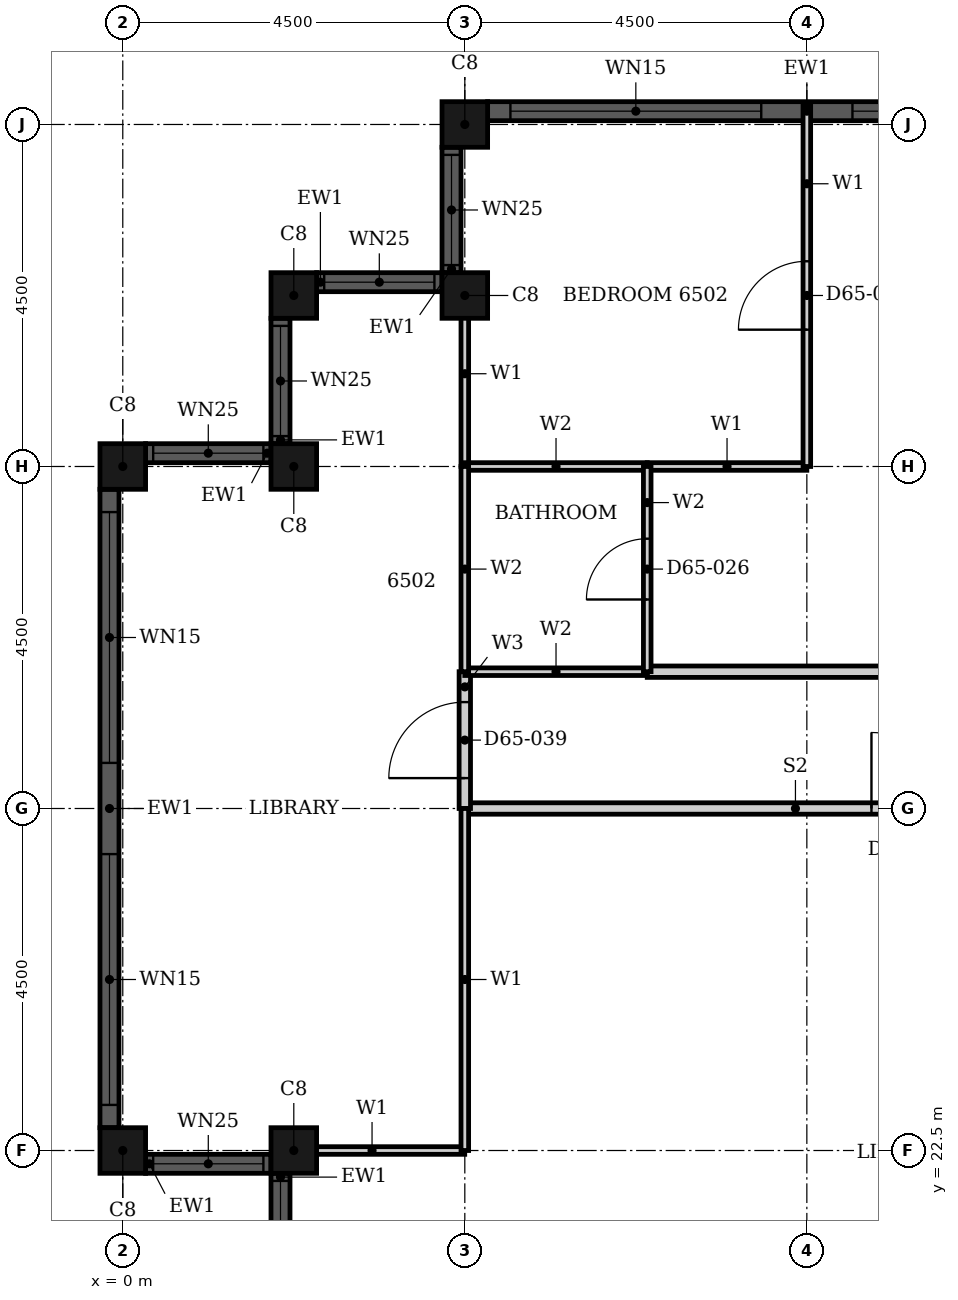
"""IFC4 building model, lengths in metres.
Left out: names, types, materials, properties, quantities, classifications, styles, units other than length and angle.
Written with IfcOpenShell. Run it as: python <this file> out.ifc"""

import sys

from ifc_helpers import new_model, si_unit, direction, frame, frame_2d, origin, origin_2d, place, context, subcontext, project, spatial, rectangle, hollow_rectangle, extrude, element, fill, save


model = new_model("IFC4")
c1 = context("Model", 3, precision=1e-05, world=origin(), true_north=direction((0.0, 1.0)))
c2 = subcontext(c1, "Body", "Model", "MODEL_VIEW")
j1 = project(units=[si_unit("LENGTHUNIT", "METRE"), si_unit("PLANEANGLEUNIT", "RADIAN")], contexts=[c1])
p1 = place(None, origin())
s1 = spatial("IfcSite", under=j1, at=p1, CompositionType="ELEMENT")
p2 = place(p1, origin())
s2 = spatial("IfcBuilding", under=s1, at=p2, CompositionType="ELEMENT")
p3 = place(p2, frame((0.0, 0.0, 256.4)))
s3 = spatial("IfcBuildingStorey", under=s2, at=p3, CompositionType="ELEMENT", Elevation=256.4)
for number, where, z_axis, x_axis in (
    (1, (4.5, 36.0, 0.0), (0.0, 0.0, 1.0), (1.0, 0.0, 0.0)),
    (2, (4.5, 33.75, 0.0), (0.0, 0.0, 1.0), (1.0, 0.0, 0.0)),
    (3, (2.25, 33.75, 0.0), (0.0, 0.0, 1.0), (1.0, 0.0, 0.0)),
    (4, (2.25, 31.5, 0.0), (0.0, 0.0, 1.0), (1.0, 0.0, 0.0)),
    (5, (0.0, 31.5, 0.0), (0.0, 0.0, 1.0), (1.0, 0.0, 0.0)),
    (6, (0.0, 22.5, 0.0), (0.0, 0.0, 1.0), (1.0, 0.0, 0.0)),
    (7, (2.25, 22.5, 0.0), (0.0, 0.0, 1.0), (1.0, 0.0, 0.0)),
):
    element("IfcColumn", number, at=place(p3, frame(where, z_axis=z_axis, x_axis=x_axis)), inside=s3, PredefinedType="COLUMN", context=c2, shape_type="SweptSolid", body=[
        extrude(hollow_rectangle(XDim=0.6, YDim=0.6, WallThickness=0.02, at=origin_2d()), origin(), (0.0, 0.0, 1.0), 3.7),
    ])
p4 = place(p3, frame((13.2, 36.175, 0.0), z_axis=(0.0, 0.0, 1.0), x_axis=(-1.0, 0.0, 0.0)))
e8 = element("IfcWall", 8, at=p4, inside=s3, PredefinedType="SOLIDWALL", context=c2, shape_type="SweptSolid", body=[
    extrude(rectangle(XDim=8.4, YDim=0.25, at=frame_2d((4.2, 0.0))), origin(), (0.0, 0.0, 1.0), 3.7),
])
p5 = place(p4, frame((0.3, 0.0, 0.45)))
e9 = element("IfcOpeningElement", 9, at=p5, cuts=e8, PredefinedType="OPENING", context=c2, shape_type="SweptSolid", body=[
    extrude(rectangle(XDim=3.3, YDim=2.3, at=frame_2d((1.65, 1.15))), frame((0.0, 0.135, 0.0), z_axis=(0.0, -1.0, 0.0), x_axis=(1.0, 0.0, 0.0)), (0.0, 0.0, 1.0), 0.27),
])
p6 = place(p4, frame((4.8, 0.0, 0.45)))
e10 = element("IfcOpeningElement", 10, at=p6, cuts=e8, PredefinedType="OPENING", context=c2, shape_type="SweptSolid", body=[
    extrude(rectangle(XDim=3.3, YDim=2.3, at=frame_2d((1.65, 1.15))), frame((0.0, 0.135, 0.0), z_axis=(0.0, -1.0, 0.0), x_axis=(1.0, 0.0, 0.0)), (0.0, 0.0, 1.0), 0.27),
])
p7 = place(p3, frame((4.325, 35.7, 0.0), z_axis=(0.0, 0.0, 1.0), x_axis=(0.0, -1.0, 0.0)))
e11 = element("IfcWall", 11, at=p7, inside=s3, PredefinedType="SOLIDWALL", context=c2, shape_type="SweptSolid", body=[
    extrude(rectangle(XDim=1.65, YDim=0.25, at=frame_2d((0.825, 0.0))), origin(), (0.0, 0.0, 1.0), 3.7),
])
p8 = place(p7, frame((0.1, 0.0, 0.9)))
e12 = element("IfcOpeningElement", 12, at=p8, cuts=e11, PredefinedType="OPENING", context=c2, shape_type="SweptSolid", body=[
    extrude(rectangle(XDim=1.45, YDim=1.85, at=frame_2d((0.725, 0.925))), frame((0.0, 0.135, 0.0), z_axis=(0.0, -1.0, 0.0), x_axis=(1.0, 0.0, 0.0)), (0.0, 0.0, 1.0), 0.27),
])
p9 = place(p3, frame((4.2, 33.925, 0.0), z_axis=(0.0, 0.0, 1.0), x_axis=(-1.0, 0.0, 0.0)))
e13 = element("IfcWall", 13, at=p9, inside=s3, PredefinedType="SOLIDWALL", context=c2, shape_type="SweptSolid", body=[
    extrude(rectangle(XDim=1.65, YDim=0.25, at=frame_2d((0.825, 0.0))), origin(), (0.0, 0.0, 1.0), 3.7),
])
p10 = place(p9, frame((0.1, 0.0, 0.9)))
e14 = element("IfcOpeningElement", 14, at=p10, cuts=e13, PredefinedType="OPENING", context=c2, shape_type="SweptSolid", body=[
    extrude(rectangle(XDim=1.45, YDim=1.85, at=frame_2d((0.725, 0.925))), frame((0.0, 0.135, 0.0), z_axis=(0.0, -1.0, 0.0), x_axis=(1.0, 0.0, 0.0)), (0.0, 0.0, 1.0), 0.27),
])
p11 = place(p3, frame((2.075, 33.45, 0.0), z_axis=(0.0, 0.0, 1.0), x_axis=(0.0, -1.0, 0.0)))
e15 = element("IfcWall", 15, at=p11, inside=s3, PredefinedType="SOLIDWALL", context=c2, shape_type="SweptSolid", body=[
    extrude(rectangle(XDim=1.65, YDim=0.25, at=frame_2d((0.825, 0.0))), origin(), (0.0, 0.0, 1.0), 3.7),
])
p12 = place(p11, frame((0.1, 0.0, 0.9)))
e16 = element("IfcOpeningElement", 16, at=p12, cuts=e15, PredefinedType="OPENING", context=c2, shape_type="SweptSolid", body=[
    extrude(rectangle(XDim=1.45, YDim=1.85, at=frame_2d((0.725, 0.925))), frame((0.0, 0.135, 0.0), z_axis=(0.0, -1.0, 0.0), x_axis=(1.0, 0.0, 0.0)), (0.0, 0.0, 1.0), 0.27),
])
p13 = place(p3, frame((1.95, 31.675, 0.0), z_axis=(0.0, 0.0, 1.0), x_axis=(-1.0, 0.0, 0.0)))
e17 = element("IfcWall", 17, at=p13, inside=s3, PredefinedType="SOLIDWALL", context=c2, shape_type="SweptSolid", body=[
    extrude(rectangle(XDim=1.65, YDim=0.25, at=frame_2d((0.825, 0.0))), origin(), (0.0, 0.0, 1.0), 3.7),
])
p14 = place(p13, frame((0.1, 0.0, 0.9)))
e18 = element("IfcOpeningElement", 18, at=p14, cuts=e17, PredefinedType="OPENING", context=c2, shape_type="SweptSolid", body=[
    extrude(rectangle(XDim=1.45, YDim=1.85, at=frame_2d((0.725, 0.925))), frame((0.0, 0.135, 0.0), z_axis=(0.0, -1.0, 0.0), x_axis=(1.0, 0.0, 0.0)), (0.0, 0.0, 1.0), 0.27),
])
p15 = place(p3, frame((-0.175, 31.2, 0.0), z_axis=(0.0, 0.0, 1.0), x_axis=(0.0, -1.0, 0.0)))
e19 = element("IfcWall", 19, at=p15, inside=s3, PredefinedType="SOLIDWALL", context=c2, shape_type="SweptSolid", body=[
    extrude(rectangle(XDim=8.4, YDim=0.25, at=frame_2d((4.2, 0.0))), origin(), (0.0, 0.0, 1.0), 3.7),
])
p16 = place(p15, frame((0.3, 0.0, 0.45)))
e20 = element("IfcOpeningElement", 20, at=p16, cuts=e19, PredefinedType="OPENING", context=c2, shape_type="SweptSolid", body=[
    extrude(rectangle(XDim=3.3, YDim=2.3, at=frame_2d((1.65, 1.15))), frame((0.0, 0.135, 0.0), z_axis=(0.0, -1.0, 0.0), x_axis=(1.0, 0.0, 0.0)), (0.0, 0.0, 1.0), 0.27),
])
p17 = place(p15, frame((4.8, 0.0, 0.45)))
e21 = element("IfcOpeningElement", 21, at=p17, cuts=e19, PredefinedType="OPENING", context=c2, shape_type="SweptSolid", body=[
    extrude(rectangle(XDim=3.3, YDim=2.3, at=frame_2d((1.65, 1.15))), frame((0.0, 0.135, 0.0), z_axis=(0.0, -1.0, 0.0), x_axis=(1.0, 0.0, 0.0)), (0.0, 0.0, 1.0), 0.27),
])
p18 = place(p3, frame((0.3, 22.325, 0.0), z_axis=(0.0, 0.0, 1.0), x_axis=(1.0, 0.0, 0.0)))
e22 = element("IfcWall", 22, at=p18, inside=s3, PredefinedType="SOLIDWALL", context=c2, shape_type="SweptSolid", body=[
    extrude(rectangle(XDim=1.65, YDim=0.25, at=frame_2d((0.825, 0.0))), origin(), (0.0, 0.0, 1.0), 3.7),
])
p19 = place(p18, frame((0.1, 0.0, 0.9)))
e23 = element("IfcOpeningElement", 23, at=p19, cuts=e22, PredefinedType="OPENING", context=c2, shape_type="SweptSolid", body=[
    extrude(rectangle(XDim=1.45, YDim=1.85, at=frame_2d((0.725, 0.925))), frame((0.0, 0.135, 0.0), z_axis=(0.0, -1.0, 0.0), x_axis=(1.0, 0.0, 0.0)), (0.0, 0.0, 1.0), 0.27),
])
p20 = place(p3, frame((2.075, 22.2, 0.0), z_axis=(0.0, 0.0, 1.0), x_axis=(0.0, -1.0, 0.0)))
e24 = element("IfcWall", 24, at=p20, inside=s3, PredefinedType="SOLIDWALL", context=c2, shape_type="SweptSolid", body=[
    extrude(rectangle(XDim=1.65, YDim=0.25, at=frame_2d((0.825, 0.0))), origin(), (0.0, 0.0, 1.0), 3.7),
])
p21 = place(p20, frame((0.1, 0.0, 0.9)))
e25 = element("IfcOpeningElement", 25, at=p21, cuts=e24, PredefinedType="OPENING", context=c2, shape_type="SweptSolid", body=[
    extrude(rectangle(XDim=1.45, YDim=1.85, at=frame_2d((0.725, 0.925))), frame((0.0, 0.135, 0.0), z_axis=(0.0, -1.0, 0.0), x_axis=(1.0, 0.0, 0.0)), (0.0, 0.0, 1.0), 0.27),
])
p22 = place(p3, frame((4.5, 27.0, 0.0), z_axis=(0.0, 0.0, 1.0), x_axis=(1.0, 0.0, 0.0)))
e26 = element("IfcWall", 26, at=p22, inside=s3, PredefinedType="PARTITIONING", context=c2, shape_type="SweptSolid", body=[
    extrude(rectangle(XDim=13.5, YDim=0.15, at=frame_2d((6.75, 0.0))), origin(), (0.0, 0.0, 1.0), 2.68),
])
p23 = place(p22, frame((5.35, 0.0, 0.0)))
e27 = element("IfcOpeningElement", 27, at=p23, cuts=e26, PredefinedType="OPENING", context=c2, shape_type="SweptSolid", body=[
    extrude(rectangle(XDim=1.0, YDim=2.1, at=frame_2d((0.5, 1.05))), frame((0.0, 0.085, 0.0), z_axis=(0.0, -1.0, 0.0), x_axis=(1.0, 0.0, 0.0)), (0.0, 0.0, 1.0), 0.17),
])
p24 = place(p3, frame((6.9, 28.8, 0.0), z_axis=(0.0, 0.0, 1.0), x_axis=(1.0, 0.0, 0.0)))
e28 = element("IfcWall", 28, at=p24, inside=s3, PredefinedType="PARTITIONING", context=c2, shape_type="SweptSolid", body=[
    extrude(rectangle(XDim=9.299, YDim=0.15, at=frame_2d((4.649, 0.0))), origin(), (0.0, 0.0, 1.0), 3.4),
])
p25 = place(p3, frame((4.5, 27.0, 0.0), z_axis=(0.0, 0.0, 1.0), x_axis=(0.0, 1.0, 0.0)))
e29 = element("IfcWall", 29, at=p25, inside=s3, PredefinedType="PARTITIONING", context=c2, shape_type="SweptSolid", body=[
    extrude(rectangle(XDim=1.8, YDim=0.15, at=frame_2d((0.9, 0.0))), origin(), (0.0, 0.0, 1.0), 3.4),
])
p26 = place(p25, frame((0.4, 0.0, 0.0)))
e30 = element("IfcOpeningElement", 30, at=p26, cuts=e29, PredefinedType="OPENING", context=c2, shape_type="SweptSolid", body=[
    extrude(rectangle(XDim=1.0, YDim=2.1, at=frame_2d((0.5, 1.05))), frame((0.0, 0.085, 0.0), z_axis=(0.0, -1.0, 0.0), x_axis=(1.0, 0.0, 0.0)), (0.0, 0.0, 1.0), 0.17),
])
p27 = place(p3, frame((2.06, 22.5, 0.0), z_axis=(0.0, 0.0, 1.0), x_axis=(1.0, 0.0, 0.0)))
e31 = element("IfcWall", 31, at=p27, inside=s3, PredefinedType="PARTITIONING", context=c2, shape_type="SweptSolid", body=[
    extrude(rectangle(XDim=2.439, YDim=0.1, at=frame_2d((1.219, 0.0))), origin(), (0.0, 0.0, 1.0), 2.68),
])
p28 = place(p3, frame((6.9, 31.5, 0.0), z_axis=(0.0, 0.0, 1.0), x_axis=(1.0, 0.0, 0.0)))
e32 = element("IfcWall", 32, at=p28, inside=s3, PredefinedType="PARTITIONING", context=c2, shape_type="SweptSolid", body=[
    extrude(rectangle(XDim=2.1, YDim=0.1, at=frame_2d((1.05, 0.0))), origin(), (0.0, 0.0, 1.0), 2.68),
])
p29 = place(p3, frame((4.5, 31.501, 0.0), z_axis=(0.0, 0.0, 1.0), x_axis=(0.0, 1.0, 0.0)))
e33 = element("IfcWall", 33, at=p29, inside=s3, PredefinedType="PARTITIONING", context=c2, shape_type="SweptSolid", body=[
    extrude(rectangle(XDim=2.439, YDim=0.1, at=frame_2d((1.219, 0.0))), origin(), (0.0, 0.0, 1.0), 3.4),
])
p30 = place(p3, frame((4.5, 22.5, 0.0), z_axis=(0.0, 0.0, 1.0), x_axis=(0.0, 1.0, 0.0)))
e34 = element("IfcWall", 34, at=p30, inside=s3, PredefinedType="PARTITIONING", context=c2, shape_type="SweptSolid", body=[
    extrude(rectangle(XDim=4.5, YDim=0.1, at=frame_2d((2.25, 0.0))), origin(), (0.0, 0.0, 1.0), 3.4),
])
p31 = place(p3, frame((9.0, 31.5, 0.0), z_axis=(0.0, 0.0, 1.0), x_axis=(0.0, 1.0, 0.0)))
e35 = element("IfcWall", 35, at=p31, inside=s3, PredefinedType="PARTITIONING", context=c2, shape_type="SweptSolid", body=[
    extrude(rectangle(XDim=4.74, YDim=0.1, at=frame_2d((2.37, 0.0))), origin(), (0.0, 0.0, 1.0), 3.4),
])
p32 = place(p31, frame((1.8, 0.0, 0.0)))
e36 = element("IfcOpeningElement", 36, at=p32, cuts=e35, PredefinedType="OPENING", context=c2, shape_type="SweptSolid", body=[
    extrude(rectangle(XDim=0.9, YDim=2.1, at=frame_2d((0.45, 1.05))), frame((0.0, 0.06, 0.0), z_axis=(0.0, -1.0, 0.0), x_axis=(1.0, 0.0, 0.0)), (0.0, 0.0, 1.0), 0.12),
])
p33 = place(p3, frame((4.5, 28.8, 0.0), z_axis=(0.0, 0.0, 1.0), x_axis=(1.0, 0.0, 0.0)))
e37 = element("IfcWall", 37, at=p33, inside=s3, PredefinedType="PARTITIONING", context=c2, shape_type="SweptSolid", body=[
    extrude(rectangle(XDim=2.4, YDim=0.1, at=frame_2d((1.2, 0.0))), origin(), (0.0, 0.0, 1.0), 3.4),
])
p34 = place(p3, frame((4.5, 31.5, 0.0), z_axis=(0.0, 0.0, 1.0), x_axis=(1.0, 0.0, 0.0)))
e38 = element("IfcWall", 38, at=p34, inside=s3, PredefinedType="PARTITIONING", context=c2, shape_type="SweptSolid", body=[
    extrude(rectangle(XDim=2.4, YDim=0.1, at=frame_2d((1.2, 0.0))), origin(), (0.0, 0.0, 1.0), 2.68),
])
p35 = place(p3, frame((4.5, 28.8, 0.0), z_axis=(0.0, 0.0, 1.0), x_axis=(0.0, 1.0, 0.0)))
e39 = element("IfcWall", 39, at=p35, inside=s3, PredefinedType="PARTITIONING", context=c2, shape_type="SweptSolid", body=[
    extrude(rectangle(XDim=2.7, YDim=0.1, at=frame_2d((1.35, 0.0))), origin(), (0.0, 0.0, 1.0), 3.4),
])
p36 = place(p3, frame((6.9, 28.8, 0.0), z_axis=(0.0, 0.0, 1.0), x_axis=(0.0, 1.0, 0.0)))
e40 = element("IfcWall", 40, at=p36, inside=s3, PredefinedType="PARTITIONING", context=c2, shape_type="SweptSolid", body=[
    extrude(rectangle(XDim=2.7, YDim=0.1, at=frame_2d((1.35, 0.0))), origin(), (0.0, 0.0, 1.0), 3.4),
])
p37 = place(p36, frame((0.95, 0.0, 0.0)))
e41 = element("IfcOpeningElement", 41, at=p37, cuts=e40, PredefinedType="OPENING", context=c2, shape_type="SweptSolid", body=[
    extrude(rectangle(XDim=0.8, YDim=2.1, at=frame_2d((0.4, 1.05))), frame((0.0, 0.06, 0.0), z_axis=(0.0, -1.0, 0.0), x_axis=(1.0, 0.0, 0.0)), (0.0, 0.0, 1.0), 0.12),
])
p38 = place(p5, origin())
e42 = element("IfcWindow", 42, at=p38, inside=s3, PartitioningType="SINGLE_PANEL", PredefinedType="WINDOW", context=c2, shape_type="SweptSolid", body=[
    extrude(rectangle(XDim=3.3, YDim=2.3, at=frame_2d((1.65, 1.15))), frame((0.0, 0.03, 0.0), z_axis=(0.0, -1.0, 0.0), x_axis=(1.0, 0.0, 0.0)), (0.0, 0.0, 1.0), 0.06),
])
fill(e9, e42)
p39 = place(p6, origin())
e43 = element("IfcWindow", 43, at=p39, inside=s3, PartitioningType="SINGLE_PANEL", PredefinedType="WINDOW", context=c2, shape_type="SweptSolid", body=[
    extrude(rectangle(XDim=3.3, YDim=2.3, at=frame_2d((1.65, 1.15))), frame((0.0, 0.03, 0.0), z_axis=(0.0, -1.0, 0.0), x_axis=(1.0, 0.0, 0.0)), (0.0, 0.0, 1.0), 0.06),
])
fill(e10, e43)
p40 = place(p8, origin())
e44 = element("IfcWindow", 44, at=p40, inside=s3, PartitioningType="SINGLE_PANEL", PredefinedType="WINDOW", context=c2, shape_type="SweptSolid", body=[
    extrude(rectangle(XDim=1.45, YDim=1.85, at=frame_2d((0.725, 0.925))), frame((0.0, 0.03, 0.0), z_axis=(0.0, -1.0, 0.0), x_axis=(1.0, 0.0, 0.0)), (0.0, 0.0, 1.0), 0.06),
])
fill(e12, e44)
p41 = place(p10, origin())
e45 = element("IfcWindow", 45, at=p41, inside=s3, PartitioningType="SINGLE_PANEL", PredefinedType="WINDOW", context=c2, shape_type="SweptSolid", body=[
    extrude(rectangle(XDim=1.45, YDim=1.85, at=frame_2d((0.725, 0.925))), frame((0.0, 0.03, 0.0), z_axis=(0.0, -1.0, 0.0), x_axis=(1.0, 0.0, 0.0)), (0.0, 0.0, 1.0), 0.06),
])
fill(e14, e45)
p42 = place(p12, origin())
e46 = element("IfcWindow", 46, at=p42, inside=s3, PartitioningType="SINGLE_PANEL", PredefinedType="WINDOW", context=c2, shape_type="SweptSolid", body=[
    extrude(rectangle(XDim=1.45, YDim=1.85, at=frame_2d((0.725, 0.925))), frame((0.0, 0.03, 0.0), z_axis=(0.0, -1.0, 0.0), x_axis=(1.0, 0.0, 0.0)), (0.0, 0.0, 1.0), 0.06),
])
fill(e16, e46)
p43 = place(p14, origin())
e47 = element("IfcWindow", 47, at=p43, inside=s3, PartitioningType="SINGLE_PANEL", PredefinedType="WINDOW", context=c2, shape_type="SweptSolid", body=[
    extrude(rectangle(XDim=1.45, YDim=1.85, at=frame_2d((0.725, 0.925))), frame((0.0, 0.03, 0.0), z_axis=(0.0, -1.0, 0.0), x_axis=(1.0, 0.0, 0.0)), (0.0, 0.0, 1.0), 0.06),
])
fill(e18, e47)
p44 = place(p16, origin())
e48 = element("IfcWindow", 48, at=p44, inside=s3, PartitioningType="SINGLE_PANEL", PredefinedType="WINDOW", context=c2, shape_type="SweptSolid", body=[
    extrude(rectangle(XDim=3.3, YDim=2.3, at=frame_2d((1.65, 1.15))), frame((0.0, 0.03, 0.0), z_axis=(0.0, -1.0, 0.0), x_axis=(1.0, 0.0, 0.0)), (0.0, 0.0, 1.0), 0.06),
])
fill(e20, e48)
p45 = place(p17, origin())
e49 = element("IfcWindow", 49, at=p45, inside=s3, PartitioningType="SINGLE_PANEL", PredefinedType="WINDOW", context=c2, shape_type="SweptSolid", body=[
    extrude(rectangle(XDim=3.3, YDim=2.3, at=frame_2d((1.65, 1.15))), frame((0.0, 0.03, 0.0), z_axis=(0.0, -1.0, 0.0), x_axis=(1.0, 0.0, 0.0)), (0.0, 0.0, 1.0), 0.06),
])
fill(e21, e49)
p46 = place(p19, origin())
e50 = element("IfcWindow", 50, at=p46, inside=s3, PartitioningType="SINGLE_PANEL", PredefinedType="WINDOW", context=c2, shape_type="SweptSolid", body=[
    extrude(rectangle(XDim=1.45, YDim=1.85, at=frame_2d((0.725, 0.925))), frame((0.0, 0.03, 0.0), z_axis=(0.0, -1.0, 0.0), x_axis=(1.0, 0.0, 0.0)), (0.0, 0.0, 1.0), 0.06),
])
fill(e23, e50)
p47 = place(p21, origin())
e51 = element("IfcWindow", 51, at=p47, inside=s3, PartitioningType="SINGLE_PANEL", PredefinedType="WINDOW", context=c2, shape_type="SweptSolid", body=[
    extrude(rectangle(XDim=1.45, YDim=1.85, at=frame_2d((0.725, 0.925))), frame((0.0, 0.03, 0.0), z_axis=(0.0, -1.0, 0.0), x_axis=(1.0, 0.0, 0.0)), (0.0, 0.0, 1.0), 0.06),
])
fill(e25, e51)
p48 = place(p37, origin())
e52 = element("IfcDoor", 52, at=p48, inside=s3, OperationType="SINGLE_SWING_RIGHT", PredefinedType="DOOR", context=c2, shape_type="SweptSolid", body=[
    extrude(rectangle(XDim=0.8, YDim=2.1, at=frame_2d((0.4, 1.05))), frame((0.0, 0.025, 0.0), z_axis=(0.0, -1.0, 0.0), x_axis=(1.0, 0.0, 0.0)), (0.0, 0.0, 1.0), 0.05),
])
fill(e41, e52)
p49 = place(p32, origin())
e53 = element("IfcDoor", 53, at=p49, inside=s3, OperationType="SINGLE_SWING_LEFT", PredefinedType="DOOR", context=c2, shape_type="SweptSolid", body=[
    extrude(rectangle(XDim=0.9, YDim=2.1, at=frame_2d((0.45, 1.05))), frame((0.0, 0.025, 0.0), z_axis=(0.0, -1.0, 0.0), x_axis=(1.0, 0.0, 0.0)), (0.0, 0.0, 1.0), 0.05),
])
fill(e36, e53)
p50 = place(p23, origin())
e54 = element("IfcDoor", 54, at=p50, inside=s3, OperationType="SINGLE_SWING_LEFT", PredefinedType="DOOR", context=c2, shape_type="SweptSolid", body=[
    extrude(rectangle(XDim=1.0, YDim=2.1, at=frame_2d((0.5, 1.05))), frame((0.0, 0.025, 0.0), z_axis=(0.0, -1.0, 0.0), x_axis=(1.0, 0.0, 0.0)), (0.0, 0.0, 1.0), 0.05),
])
fill(e27, e54)
p51 = place(p26, origin())
e55 = element("IfcDoor", 55, at=p51, inside=s3, OperationType="SINGLE_SWING_LEFT", PredefinedType="DOOR", context=c2, shape_type="SweptSolid", body=[
    extrude(rectangle(XDim=1.0, YDim=2.1, at=frame_2d((0.5, 1.05))), frame((0.0, 0.025, 0.0), z_axis=(0.0, -1.0, 0.0), x_axis=(1.0, 0.0, 0.0)), (0.0, 0.0, 1.0), 0.05),
])
fill(e30, e55)
save(model, sys.argv[1])
